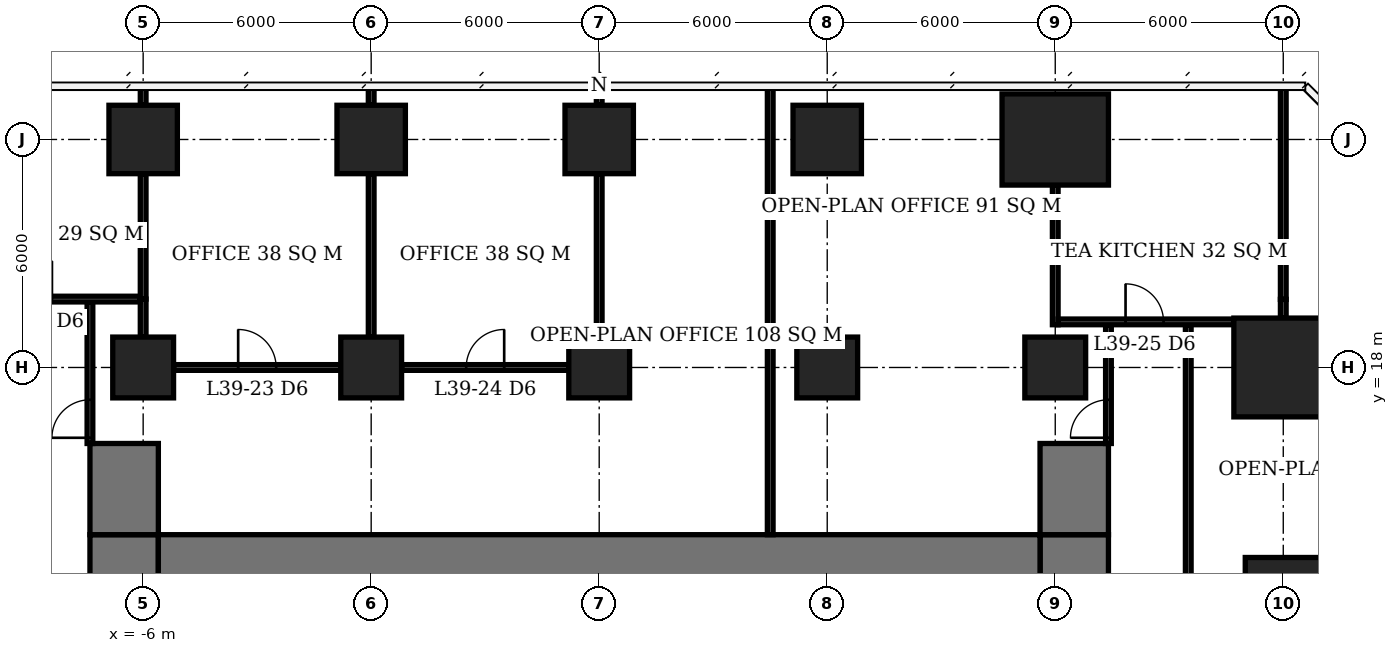
"""IFC4 building model, lengths in metres.
Left out: names, types, materials, properties, quantities, classifications, styles, units other than length and angle.
Written with IfcOpenShell. Run it as: python <this file> out.ifc"""

import sys

from ifc_helpers import new_model, si_unit, direction, frame, frame_2d, origin, origin_2d, place, context, subcontext, project, spatial, rectangle, extrude, element, fill, save


model = new_model("IFC4")
c1 = context("Model", 3, precision=1e-05, world=origin(), true_north=direction((0.0, 1.0)))
c2 = subcontext(c1, "Body", "Model", "MODEL_VIEW")
j1 = project(units=[si_unit("LENGTHUNIT", "METRE"), si_unit("PLANEANGLEUNIT", "RADIAN")], contexts=[c1])
p1 = place(None, origin())
s1 = spatial("IfcSite", under=j1, at=p1, CompositionType="ELEMENT")
p2 = place(p1, origin())
s2 = spatial("IfcBuilding", under=s1, at=p2, CompositionType="ELEMENT")
p3 = place(p2, frame((0.0, 0.0, 160.1)))
s3 = spatial("IfcBuildingStorey", under=s2, at=p3, CompositionType="ELEMENT", Elevation=160.1)
p4 = place(p3, frame((-6.0, 18.0, 0.0), z_axis=(0.0, 0.0, 1.0), x_axis=(1.0, 0.0, 0.0)))
e1 = element("IfcColumn", 1, at=p4, inside=s3, PredefinedType="COLUMN", context=c2, shape_type="SweptSolid", body=[
    extrude(rectangle(XDim=1.6, YDim=1.6, at=origin_2d()), origin(), (0.0, 0.0, 1.0), 3.9),
])
p5 = place(p3, frame((-6.0, 24.0, 0.0), z_axis=(0.0, 0.0, 1.0), x_axis=(1.0, 0.0, 0.0)))
e2 = element("IfcColumn", 2, at=p5, inside=s3, PredefinedType="COLUMN", context=c2, shape_type="SweptSolid", body=[
    extrude(rectangle(XDim=1.8, YDim=1.8, at=origin_2d()), origin(), (0.0, 0.0, 1.0), 3.9),
])
p6 = place(p3, frame((0.0, 18.0, 0.0), z_axis=(0.0, 0.0, 1.0), x_axis=(1.0, 0.0, 0.0)))
e3 = element("IfcColumn", 3, at=p6, inside=s3, PredefinedType="COLUMN", context=c2, shape_type="SweptSolid", body=[
    extrude(rectangle(XDim=1.6, YDim=1.6, at=origin_2d()), origin(), (0.0, 0.0, 1.0), 3.9),
])
p7 = place(p3, frame((0.0, 24.0, 0.0), z_axis=(0.0, 0.0, 1.0), x_axis=(1.0, 0.0, 0.0)))
e4 = element("IfcColumn", 4, at=p7, inside=s3, PredefinedType="COLUMN", context=c2, shape_type="SweptSolid", body=[
    extrude(rectangle(XDim=1.8, YDim=1.8, at=origin_2d()), origin(), (0.0, 0.0, 1.0), 3.9),
])
p8 = place(p3, frame((6.0, 18.0, 0.0), z_axis=(0.0, 0.0, 1.0), x_axis=(1.0, 0.0, 0.0)))
e5 = element("IfcColumn", 5, at=p8, inside=s3, PredefinedType="COLUMN", context=c2, shape_type="SweptSolid", body=[
    extrude(rectangle(XDim=1.6, YDim=1.6, at=origin_2d()), origin(), (0.0, 0.0, 1.0), 3.9),
])
p9 = place(p3, frame((6.0, 24.0, 0.0), z_axis=(0.0, 0.0, 1.0), x_axis=(1.0, 0.0, 0.0)))
e6 = element("IfcColumn", 6, at=p9, inside=s3, PredefinedType="COLUMN", context=c2, shape_type="SweptSolid", body=[
    extrude(rectangle(XDim=1.8, YDim=1.8, at=origin_2d()), origin(), (0.0, 0.0, 1.0), 3.9),
])
p10 = place(p3, frame((12.0, 18.0, 0.0), z_axis=(0.0, 0.0, 1.0), x_axis=(1.0, 0.0, 0.0)))
e7 = element("IfcColumn", 7, at=p10, inside=s3, PredefinedType="COLUMN", context=c2, shape_type="SweptSolid", body=[
    extrude(rectangle(XDim=1.6, YDim=1.6, at=origin_2d()), origin(), (0.0, 0.0, 1.0), 3.9),
])
p11 = place(p3, frame((12.0, 24.0, 0.0), z_axis=(0.0, 0.0, 1.0), x_axis=(1.0, 0.0, 0.0)))
e8 = element("IfcColumn", 8, at=p11, inside=s3, PredefinedType="COLUMN", context=c2, shape_type="SweptSolid", body=[
    extrude(rectangle(XDim=1.8, YDim=1.8, at=origin_2d()), origin(), (0.0, 0.0, 1.0), 3.9),
])
p12 = place(p3, frame((18.0, 18.0, 0.0), z_axis=(0.0, 0.0, 1.0), x_axis=(1.0, 0.0, 0.0)))
e9 = element("IfcColumn", 9, at=p12, inside=s3, PredefinedType="COLUMN", context=c2, shape_type="SweptSolid", body=[
    extrude(rectangle(XDim=1.6, YDim=1.6, at=origin_2d()), origin(), (0.0, 0.0, 1.0), 3.9),
])
p13 = place(p3, frame((18.0, 24.0, 0.0), z_axis=(0.0, 0.0, 1.0), x_axis=(1.0, 0.0, 0.0)))
e10 = element("IfcColumn", 10, at=p13, inside=s3, PredefinedType="COLUMN", context=c2, shape_type="SweptSolid", body=[
    extrude(rectangle(XDim=2.8, YDim=2.4, at=origin_2d()), origin(), (0.0, 0.0, 1.0), 3.9),
])
p14 = place(p3, frame((24.0, 12.0, 0.0), z_axis=(0.0, 0.0, 1.0), x_axis=(1.0, 0.0, 0.0)))
e11 = element("IfcColumn", 11, at=p14, inside=s3, PredefinedType="COLUMN", context=c2, shape_type="SweptSolid", body=[
    extrude(rectangle(XDim=2.0, YDim=2.0, at=origin_2d()), origin(), (0.0, 0.0, 1.0), 3.9),
])
p15 = place(p3, frame((24.0, 18.0, 0.0), z_axis=(0.0, 0.0, 1.0), x_axis=(1.0, 0.0, 0.0)))
e12 = element("IfcColumn", 12, at=p15, inside=s3, PredefinedType="COLUMN", context=c2, shape_type="SweptSolid", body=[
    extrude(rectangle(XDim=2.6, YDim=2.6, at=origin_2d()), origin(), (0.0, 0.0, 1.0), 3.9),
])
p16 = place(p3, frame((-5.6, 12.6, 0.0), z_axis=(0.0, 0.0, 1.0), x_axis=(1.0, 0.0, 0.0)))
e13 = element("IfcWall", 13, at=p16, inside=s3, PredefinedType="SHEAR", context=c2, shape_type="SweptSolid", body=[
    extrude(rectangle(XDim=23.2, YDim=2.0, at=frame_2d((11.6, 0.0))), origin(), (0.0, 0.0, 1.0), 3.9),
])
p17 = place(p3, frame((-6.5, -7.6, 0.0), z_axis=(0.0, 0.0, 1.0), x_axis=(0.0, 1.0, 0.0)))
e14 = element("IfcWall", 14, at=p17, inside=s3, PredefinedType="SHEAR", context=c2, shape_type="SweptSolid", body=[
    extrude(rectangle(XDim=21.2, YDim=1.8, at=frame_2d((10.6, 0.0))), origin(), (0.0, 0.0, 1.0), 3.9),
])
p18 = place(p17, frame((7.8, 0.0, 0.0)))
e15 = element("IfcOpeningElement", 15, at=p18, cuts=e14, PredefinedType="OPENING", context=c2, shape_type="SweptSolid", body=[
    extrude(rectangle(XDim=1.8, YDim=2.4, at=frame_2d((0.9, 1.2))), frame((0.0, 0.91, 0.0), z_axis=(0.0, -1.0, 0.0), x_axis=(1.0, 0.0, 0.0)), (0.0, 0.0, 1.0), 1.82),
])
p19 = place(p3, frame((18.5, -7.6, 0.0), z_axis=(0.0, 0.0, 1.0), x_axis=(0.0, 1.0, 0.0)))
e16 = element("IfcWall", 16, at=p19, inside=s3, PredefinedType="SHEAR", context=c2, shape_type="SweptSolid", body=[
    extrude(rectangle(XDim=21.2, YDim=1.8, at=frame_2d((10.6, 0.0))), origin(), (0.0, 0.0, 1.0), 3.9),
])
p20 = place(p19, frame((9.2, 0.0, 0.0)))
e17 = element("IfcOpeningElement", 17, at=p20, cuts=e16, PredefinedType="OPENING", context=c2, shape_type="SweptSolid", body=[
    extrude(rectangle(XDim=1.8, YDim=2.4, at=frame_2d((0.9, 1.2))), frame((0.0, 0.91, 0.0), z_axis=(0.0, -1.0, 0.0), x_axis=(1.0, 0.0, 0.0)), (0.0, 0.0, 1.0), 1.82),
])
for number, where, z_axis, x_axis in (
    (18, (-6.5, 13.6, 0.0), (0.0, 0.0, 1.0), (0.0, 1.0, 0.0)),
    (19, (18.5, 13.6, 0.0), (0.0, 0.0, 1.0), (0.0, 1.0, 0.0)),
):
    element("IfcWall", number, at=place(p3, frame(where, z_axis=z_axis, x_axis=x_axis)), inside=s3, PredefinedType="SHEAR", context=c2, shape_type="SweptSolid", body=[
        extrude(rectangle(XDim=2.4, YDim=1.8, at=frame_2d((1.2, 0.0))), origin(), (0.0, 0.0, 1.0), 3.9),
    ])
p21 = place(p3, frame((-5.2, 18.0, 0.0), z_axis=(0.0, 0.0, 1.0), x_axis=(1.0, 0.0, 0.0)))
e20 = element("IfcWall", 20, at=p21, inside=s3, PredefinedType="PARTITIONING", context=c2, shape_type="SweptSolid", body=[
    extrude(rectangle(XDim=4.4, YDim=0.15, at=frame_2d((2.2, 0.0))), origin(), (0.0, 0.0, 1.0), 3.65),
])
p22 = place(p21, frame((1.7, 0.0, 0.0)))
e21 = element("IfcOpeningElement", 21, at=p22, cuts=e20, PredefinedType="OPENING", context=c2, shape_type="SweptSolid", body=[
    extrude(rectangle(XDim=1.0, YDim=2.1, at=frame_2d((0.5, 1.05))), frame((0.0, 0.085, 0.0), z_axis=(0.0, -1.0, 0.0), x_axis=(1.0, 0.0, 0.0)), (0.0, 0.0, 1.0), 0.17),
])
p23 = place(p3, frame((0.8, 18.0, 0.0), z_axis=(0.0, 0.0, 1.0), x_axis=(1.0, 0.0, 0.0)))
e22 = element("IfcWall", 22, at=p23, inside=s3, PredefinedType="PARTITIONING", context=c2, shape_type="SweptSolid", body=[
    extrude(rectangle(XDim=4.4, YDim=0.15, at=frame_2d((2.2, 0.0))), origin(), (0.0, 0.0, 1.0), 3.65),
])
p24 = place(p23, frame((1.7, 0.0, 0.0)))
e23 = element("IfcOpeningElement", 23, at=p24, cuts=e22, PredefinedType="OPENING", context=c2, shape_type="SweptSolid", body=[
    extrude(rectangle(XDim=1.0, YDim=2.1, at=frame_2d((0.5, 1.05))), frame((0.0, 0.085, 0.0), z_axis=(0.0, -1.0, 0.0), x_axis=(1.0, 0.0, 0.0)), (0.0, 0.0, 1.0), 0.17),
])
p25 = place(p3, frame((18.075, 19.2, 0.0), z_axis=(0.0, 0.0, 1.0), x_axis=(1.0, 0.0, 0.0)))
e24 = element("IfcWall", 24, at=p25, inside=s3, PredefinedType="PARTITIONING", context=c2, shape_type="SweptSolid", body=[
    extrude(rectangle(XDim=4.625, YDim=0.15, at=frame_2d((2.312, 0.0))), origin(), (0.0, 0.0, 1.0), 3.65),
])
p26 = place(p25, frame((1.775, 0.0, 0.0)))
e25 = element("IfcOpeningElement", 25, at=p26, cuts=e24, PredefinedType="OPENING", context=c2, shape_type="SweptSolid", body=[
    extrude(rectangle(XDim=1.0, YDim=2.1, at=frame_2d((0.5, 1.05))), frame((0.0, 0.085, 0.0), z_axis=(0.0, -1.0, 0.0), x_axis=(1.0, 0.0, 0.0)), (0.0, 0.0, 1.0), 0.17),
])
p27 = place(p3, frame((-11.925, 19.8, 0.0), z_axis=(0.0, 0.0, 1.0), x_axis=(1.0, 0.0, 0.0)))
e26 = element("IfcWall", 26, at=p27, inside=s3, PredefinedType="PARTITIONING", context=c2, shape_type="SweptSolid", body=[
    extrude(rectangle(XDim=5.85, YDim=0.15, at=frame_2d((2.925, 0.0))), origin(), (0.0, 0.0, 1.0), 3.65),
])
p28 = place(p27, frame((2.525, 0.0, 0.0)))
e27 = element("IfcOpeningElement", 27, at=p28, cuts=e26, PredefinedType="OPENING", context=c2, shape_type="SweptSolid", body=[
    extrude(rectangle(XDim=1.0, YDim=2.1, at=frame_2d((0.5, 1.05))), frame((0.0, 0.085, 0.0), z_axis=(0.0, -1.0, 0.0), x_axis=(1.0, 0.0, 0.0)), (0.0, 0.0, 1.0), 0.17),
])
p29 = place(p3, frame((-6.0, 18.8, 0.0), z_axis=(0.0, 0.0, 1.0), x_axis=(0.0, 1.0, 0.0)))
e28 = element("IfcWall", 28, at=p29, inside=s3, PredefinedType="PARTITIONING", context=c2, shape_type="SweptSolid", body=[
    extrude(rectangle(XDim=1.0, YDim=0.15, at=frame_2d((0.5, 0.0))), origin(), (0.0, 0.0, 1.0), 3.65),
])
p30 = place(p3, frame((-6.0, 19.8, 0.0), z_axis=(0.0, 0.0, 1.0), x_axis=(0.0, 1.0, 0.0)))
e29 = element("IfcWall", 29, at=p30, inside=s3, PredefinedType="PARTITIONING", context=c2, shape_type="SweptSolid", body=[
    extrude(rectangle(XDim=3.3, YDim=0.15, at=frame_2d((1.65, 0.0))), origin(), (0.0, 0.0, 1.0), 3.65),
])
p31 = place(p3, frame((-6.0, 24.9, 0.0), z_axis=(0.0, 0.0, 1.0), x_axis=(0.0, 1.0, 0.0)))
e30 = element("IfcWall", 30, at=p31, inside=s3, PredefinedType="PARTITIONING", context=c2, shape_type="SweptSolid", body=[
    extrude(rectangle(XDim=0.5, YDim=0.15, at=frame_2d((0.25, 0.0))), origin(), (0.0, 0.0, 1.0), 2.15),
])
p32 = place(p3, frame((0.0, 18.8, 0.0), z_axis=(0.0, 0.0, 1.0), x_axis=(0.0, 1.0, 0.0)))
e31 = element("IfcWall", 31, at=p32, inside=s3, PredefinedType="PARTITIONING", context=c2, shape_type="SweptSolid", body=[
    extrude(rectangle(XDim=4.3, YDim=0.15, at=frame_2d((2.15, 0.0))), origin(), (0.0, 0.0, 1.0), 3.65),
])
p33 = place(p3, frame((0.0, 24.9, 0.0), z_axis=(0.0, 0.0, 1.0), x_axis=(0.0, 1.0, 0.0)))
e32 = element("IfcWall", 32, at=p33, inside=s3, PredefinedType="PARTITIONING", context=c2, shape_type="SweptSolid", body=[
    extrude(rectangle(XDim=0.5, YDim=0.15, at=frame_2d((0.25, 0.0))), origin(), (0.0, 0.0, 1.0), 2.15),
])
p34 = place(p3, frame((6.0, 18.8, 0.0), z_axis=(0.0, 0.0, 1.0), x_axis=(0.0, 1.0, 0.0)))
e33 = element("IfcWall", 33, at=p34, inside=s3, PredefinedType="PARTITIONING", context=c2, shape_type="SweptSolid", body=[
    extrude(rectangle(XDim=4.3, YDim=0.15, at=frame_2d((2.15, 0.0))), origin(), (0.0, 0.0, 1.0), 3.65),
])
p35 = place(p3, frame((6.0, 24.9, 0.0), z_axis=(0.0, 0.0, 1.0), x_axis=(0.0, 1.0, 0.0)))
e34 = element("IfcWall", 34, at=p35, inside=s3, PredefinedType="PARTITIONING", context=c2, shape_type="SweptSolid", body=[
    extrude(rectangle(XDim=0.45, YDim=0.15, at=frame_2d((0.225, 0.0))), origin(), (0.0, 0.0, 1.0), 2.15),
])
p36 = place(p3, frame((18.0, 19.125, 0.0), z_axis=(0.0, 0.0, 1.0), x_axis=(0.0, 1.0, 0.0)))
e35 = element("IfcWall", 35, at=p36, inside=s3, PredefinedType="PARTITIONING", context=c2, shape_type="SweptSolid", body=[
    extrude(rectangle(XDim=3.675, YDim=0.15, at=frame_2d((1.837, 0.0))), origin(), (0.0, 0.0, 1.0), 3.65),
])
p37 = place(p3, frame((24.0, 19.3, 0.0), z_axis=(0.0, 0.0, 1.0), x_axis=(0.0, 1.0, 0.0)))
e36 = element("IfcWall", 36, at=p37, inside=s3, PredefinedType="PARTITIONING", context=c2, shape_type="SweptSolid", body=[
    extrude(rectangle(XDim=0.492, YDim=0.15, at=frame_2d((0.246, 0.0))), origin(), (0.0, 0.0, 1.0), 2.15),
])
p38 = place(p3, frame((24.0, 19.792, 0.0), z_axis=(0.0, 0.0, 1.0), x_axis=(0.0, 1.0, 0.0)))
e37 = element("IfcWall", 37, at=p38, inside=s3, PredefinedType="PARTITIONING", context=c2, shape_type="SweptSolid", body=[
    extrude(rectangle(XDim=5.597, YDim=0.15, at=frame_2d((2.799, 0.0))), origin(), (0.0, 0.0, 1.0), 3.65),
])
p39 = place(p3, frame((-7.4, 16.0, 0.0), z_axis=(0.0, 0.0, 1.0), x_axis=(0.0, 1.0, 0.0)))
e38 = element("IfcWall", 38, at=p39, inside=s3, PredefinedType="PARTITIONING", context=c2, shape_type="SweptSolid", body=[
    extrude(rectangle(XDim=3.725, YDim=0.15, at=frame_2d((1.863, 0.0))), origin(), (0.0, 0.0, 1.0), 3.65),
])
p40 = place(p39, frame((0.15, 0.0, 0.0)))
e39 = element("IfcOpeningElement", 39, at=p40, cuts=e38, PredefinedType="OPENING", context=c2, shape_type="SweptSolid", body=[
    extrude(rectangle(XDim=1.0, YDim=2.1, at=frame_2d((0.5, 1.05))), frame((0.0, 0.085, 0.0), z_axis=(0.0, -1.0, 0.0), x_axis=(1.0, 0.0, 0.0)), (0.0, 0.0, 1.0), 0.17),
])
p41 = place(p3, frame((10.5, 13.6, 0.0), z_axis=(0.0, 0.0, 1.0), x_axis=(0.0, 1.0, 0.0)))
e40 = element("IfcWall", 40, at=p41, inside=s3, PredefinedType="PARTITIONING", context=c2, shape_type="SweptSolid", body=[
    extrude(rectangle(XDim=11.8, YDim=0.15, at=frame_2d((5.9, 0.0))), origin(), (0.0, 0.0, 1.0), 3.65),
])
p42 = place(p3, frame((19.4, 16.0, 0.0), z_axis=(0.0, 0.0, 1.0), x_axis=(0.0, 1.0, 0.0)))
e41 = element("IfcWall", 41, at=p42, inside=s3, PredefinedType="PARTITIONING", context=c2, shape_type="SweptSolid", body=[
    extrude(rectangle(XDim=3.125, YDim=0.15, at=frame_2d((1.562, 0.0))), origin(), (0.0, 0.0, 1.0), 3.65),
])
p43 = place(p42, frame((0.15, 0.0, 0.0)))
e42 = element("IfcOpeningElement", 42, at=p43, cuts=e41, PredefinedType="OPENING", context=c2, shape_type="SweptSolid", body=[
    extrude(rectangle(XDim=1.0, YDim=2.1, at=frame_2d((0.5, 1.05))), frame((0.0, 0.085, 0.0), z_axis=(0.0, -1.0, 0.0), x_axis=(1.0, 0.0, 0.0)), (0.0, 0.0, 1.0), 0.17),
])
p44 = place(p3, frame((21.5, -1.0, 0.0), z_axis=(0.0, 0.0, 1.0), x_axis=(0.0, 1.0, 0.0)))
e43 = element("IfcWall", 43, at=p44, inside=s3, PredefinedType="PARTITIONING", context=c2, shape_type="SweptSolid", body=[
    extrude(rectangle(XDim=20.125, YDim=0.15, at=frame_2d((10.062, 0.0))), origin(), (0.0, 0.0, 1.0), 3.65),
])
p45 = place(p44, frame((12.555, 0.0, 0.0)))
e44 = element("IfcOpeningElement", 44, at=p45, cuts=e43, PredefinedType="OPENING", context=c2, shape_type="SweptSolid", body=[
    extrude(rectangle(XDim=1.0, YDim=2.1, at=frame_2d((0.5, 1.05))), frame((0.0, 0.085, 0.0), z_axis=(0.0, -1.0, 0.0), x_axis=(1.0, 0.0, 0.0)), (0.0, 0.0, 1.0), 0.17),
])
p46 = place(p22, origin())
e45 = element("IfcDoor", 45, at=p46, inside=s3, OperationType="SINGLE_SWING_LEFT", PredefinedType="DOOR", context=c2, shape_type="SweptSolid", body=[
    extrude(rectangle(XDim=1.0, YDim=2.1, at=frame_2d((0.5, 1.05))), frame((0.0, 0.025, 0.0), z_axis=(0.0, -1.0, 0.0), x_axis=(1.0, 0.0, 0.0)), (0.0, 0.0, 1.0), 0.05),
])
fill(e21, e45)
p47 = place(p24, origin())
e46 = element("IfcDoor", 46, at=p47, inside=s3, OperationType="SINGLE_SWING_RIGHT", PredefinedType="DOOR", context=c2, shape_type="SweptSolid", body=[
    extrude(rectangle(XDim=1.0, YDim=2.1, at=frame_2d((0.5, 1.05))), frame((0.0, 0.025, 0.0), z_axis=(0.0, -1.0, 0.0), x_axis=(1.0, 0.0, 0.0)), (0.0, 0.0, 1.0), 0.05),
])
fill(e23, e46)
p48 = place(p26, origin())
e47 = element("IfcDoor", 47, at=p48, inside=s3, OperationType="SINGLE_SWING_LEFT", PredefinedType="DOOR", context=c2, shape_type="SweptSolid", body=[
    extrude(rectangle(XDim=1.0, YDim=2.1, at=frame_2d((0.5, 1.05))), frame((0.0, 0.025, 0.0), z_axis=(0.0, -1.0, 0.0), x_axis=(1.0, 0.0, 0.0)), (0.0, 0.0, 1.0), 0.05),
])
fill(e25, e47)
p49 = place(p40, origin())
e48 = element("IfcDoor", 48, at=p49, inside=s3, OperationType="SINGLE_SWING_LEFT", PredefinedType="DOOR", context=c2, shape_type="SweptSolid", body=[
    extrude(rectangle(XDim=1.0, YDim=2.1, at=frame_2d((0.5, 1.05))), frame((0.0, 0.025, 0.0), z_axis=(0.0, -1.0, 0.0), x_axis=(1.0, 0.0, 0.0)), (0.0, 0.0, 1.0), 0.05),
])
fill(e39, e48)
p50 = place(p43, origin())
e49 = element("IfcDoor", 49, at=p50, inside=s3, OperationType="SINGLE_SWING_LEFT", PredefinedType="DOOR", context=c2, shape_type="SweptSolid", body=[
    extrude(rectangle(XDim=1.0, YDim=2.1, at=frame_2d((0.5, 1.05))), frame((0.0, 0.025, 0.0), z_axis=(0.0, -1.0, 0.0), x_axis=(1.0, 0.0, 0.0)), (0.0, 0.0, 1.0), 0.05),
])
fill(e42, e49)
save(model, sys.argv[1])
